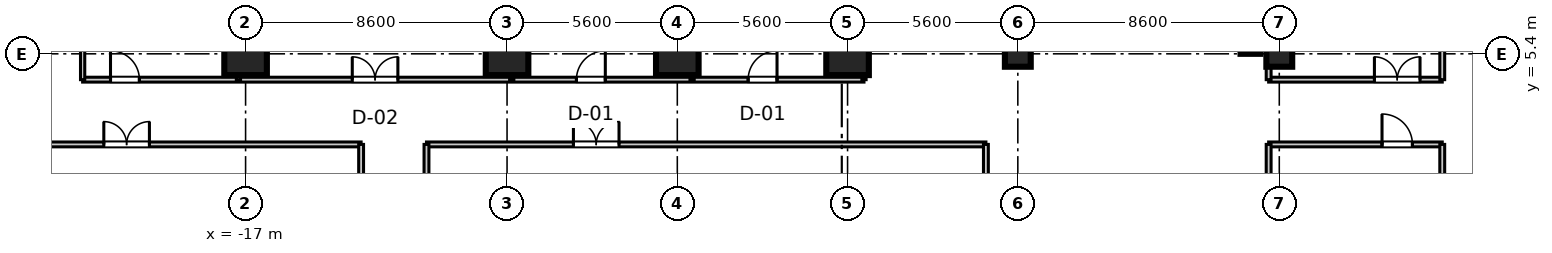
"""IFC4 building model, lengths in metres.
Left out: names, types, materials, properties, quantities, classifications, styles, units other than length and angle.
Written with IfcOpenShell. Run it as: python <this file> out.ifc"""

import sys

from ifc_helpers import new_model, si_unit, direction, frame, frame_2d, origin, origin_2d, place, context, subcontext, project, spatial, rectangle, extrude, source, transform, mapped, element, fill, save


model = new_model("IFC4")
c1 = context("Model", 3, precision=1e-05, world=origin(), true_north=direction((0.0, 1.0)))
c2 = subcontext(c1, "Body", "Model", "MODEL_VIEW")
j1 = project(units=[si_unit("LENGTHUNIT", "METRE"), si_unit("PLANEANGLEUNIT", "RADIAN")], contexts=[c1])
p1 = place(None, origin())
s1 = spatial("IfcSite", under=j1, at=p1, CompositionType="ELEMENT")
p2 = place(p1, origin())
s2 = spatial("IfcBuilding", under=s1, at=p2, CompositionType="ELEMENT")
p3 = place(p2, frame((0.0, 0.0, 39.7)))
s3 = spatial("IfcBuildingStorey", under=s2, at=p3, CompositionType="ELEMENT", Elevation=39.7)
m1 = source(origin(), c2, "Body", "SweptSolid", [
    extrude(rectangle(XDim=1.4, YDim=1.4, at=origin_2d()), origin(), (0.0, 0.0, 1.0), 3.605),
])
for number, where, z_axis, x_axis in (
    (1, (-17.0, 5.4, 0.0), (0.0, 0.0, 1.0), (1.0, 0.0, 0.0)),
    (2, (-8.4, 5.4, 0.0), (0.0, 0.0, 1.0), (1.0, 0.0, 0.0)),
    (3, (-2.8, 5.4, 0.0), (0.0, 0.0, 1.0), (1.0, 0.0, 0.0)),
    (4, (2.8, 5.4, 0.0), (0.0, 0.0, 1.0), (1.0, 0.0, 0.0)),
):
    element("IfcColumn", number, at=place(p3, frame(where, z_axis=z_axis, x_axis=x_axis)), inside=s3, PredefinedType="COLUMN", context=c2, shape_type="MappedRepresentation", body=[
        mapped(m1, transform((0.0, 0.0, 0.0), scale=1.0)),
    ])
m2 = source(origin(), c2, "Body", "SweptSolid", [
    extrude(rectangle(XDim=0.85, YDim=0.85, at=origin_2d()), origin(), (0.0, 0.0, 1.0), 3.605),
])
for number, where, z_axis, x_axis in (
    (5, (8.4, 5.4, 0.0), (0.0, 0.0, 1.0), (1.0, 0.0, 0.0)),
    (6, (17.0, 5.4, 0.0), (0.0, 0.0, 1.0), (1.0, 0.0, 0.0)),
):
    element("IfcColumn", number, at=place(p3, frame(where, z_axis=z_axis, x_axis=x_axis)), inside=s3, PredefinedType="PILASTER", context=c2, shape_type="MappedRepresentation", body=[
        mapped(m2, transform((0.0, 0.0, 0.0), scale=1.0)),
    ])
m3 = source(origin(), c2, "Body", "SweptSolid", [
    extrude(rectangle(XDim=11.6, YDim=0.65, at=frame_2d((5.8, 0.0))), origin(), (0.0, 0.0, 1.0), 3.37),
])
p4 = place(p3, frame((16.05, 5.4, 0.0), z_axis=(0.0, 0.0, 1.0), x_axis=(0.0, 1.0, 0.0)))
e7 = element("IfcWall", 7, at=p4, inside=s3, PredefinedType="SHEAR", context=c2, shape_type="MappedRepresentation", body=[
    mapped(m3, transform((0.0, 0.0, 0.0), scale=1.0)),
])
m4 = source(origin(), c2, "Body", "SweptSolid", [
    extrude(rectangle(XDim=5.71, YDim=0.16, at=frame_2d((2.855, 0.0))), origin(), (0.0, 0.0, 1.0), 2.71),
])
p5 = place(p3, frame((16.65, 4.55, 0.0), z_axis=(0.0, 0.0, 1.0), x_axis=(1.0, 0.0, 0.0)))
e8 = element("IfcWall", 8, at=p5, inside=s3, PredefinedType="PARTITIONING", context=c2, shape_type="MappedRepresentation", body=[
    mapped(m4, transform((0.0, 0.0, 0.0), scale=1.0)),
])
p6 = place(p5, frame((3.479, 0.0, 0.0)))
e9 = element("IfcOpeningElement", 9, at=p6, cuts=e8, PredefinedType="OPENING", context=c2, shape_type="SweptSolid", body=[
    extrude(rectangle(XDim=1.5, YDim=2.15, at=frame_2d((0.75, 1.075))), frame((0.0, 0.09, 0.0), z_axis=(0.0, -1.0, 0.0), x_axis=(1.0, 0.0, 0.0)), (0.0, 0.0, 1.0), 0.18),
])
m5 = source(origin(), c2, "Body", "SweptSolid", [
    extrude(rectangle(XDim=20.55, YDim=0.16, at=frame_2d((10.275, 0.0))), origin(), (0.0, 0.0, 1.0), 2.71),
])
p7 = place(p3, frame((16.65, 4.55, 0.0), z_axis=(0.0, 0.0, 1.0), x_axis=(0.0, 1.0, 0.0)))
e10 = element("IfcWall", 10, at=p7, inside=s3, PredefinedType="PARTITIONING", context=c2, shape_type="MappedRepresentation", body=[
    mapped(m5, transform((0.0, 0.0, 0.0), scale=1.0)),
])
m6 = source(origin(), c2, "Body", "SweptSolid", [
    extrude(rectangle(XDim=19.13, YDim=0.16, at=frame_2d((9.565, 0.0))), origin(), (0.0, 0.0, 1.0), 2.71),
])
p8 = place(p3, frame((22.36, 4.55, 0.0), z_axis=(0.0, 0.0, 1.0), x_axis=(0.0, 1.0, 0.0)))
e11 = element("IfcWall", 11, at=p8, inside=s3, PredefinedType="PARTITIONING", context=c2, shape_type="MappedRepresentation", body=[
    mapped(m6, transform((0.0, 0.0, 0.0), scale=1.0)),
])
m7 = source(origin(), c2, "Body", "SweptSolid", [
    extrude(rectangle(XDim=25.7, YDim=0.16, at=frame_2d((12.85, 0.0))), origin(), (0.0, 0.0, 1.0), 2.71),
])
p9 = place(p3, frame((-22.36, 4.55, 0.0), z_axis=(0.0, 0.0, 1.0), x_axis=(1.0, 0.0, 0.0)))
e12 = element("IfcWall", 12, at=p9, inside=s3, PredefinedType="PARTITIONING", context=c2, shape_type="MappedRepresentation", body=[
    mapped(m7, transform((0.0, 0.0, 0.0), scale=1.0)),
])
p10 = place(p9, frame((0.917, 0.0, 0.0)))
e13 = element("IfcOpeningElement", 13, at=p10, cuts=e12, PredefinedType="OPENING", context=c2, shape_type="SweptSolid", body=[
    extrude(rectangle(XDim=0.95, YDim=2.1, at=frame_2d((0.475, 1.05))), frame((0.0, 0.09, 0.0), z_axis=(0.0, -1.0, 0.0), x_axis=(1.0, 0.0, 0.0)), (0.0, 0.0, 1.0), 0.18),
])
p11 = place(p9, frame((8.869, 0.0, 0.0)))
e14 = element("IfcOpeningElement", 14, at=p11, cuts=e12, PredefinedType="OPENING", context=c2, shape_type="SweptSolid", body=[
    extrude(rectangle(XDim=1.5, YDim=2.15, at=frame_2d((0.75, 1.075))), frame((0.0, 0.09, 0.0), z_axis=(0.0, -1.0, 0.0), x_axis=(1.0, 0.0, 0.0)), (0.0, 0.0, 1.0), 0.18),
])
p12 = place(p9, frame((16.242, 0.0, 0.0)))
e15 = element("IfcOpeningElement", 15, at=p12, cuts=e12, PredefinedType="OPENING", context=c2, shape_type="SweptSolid", body=[
    extrude(rectangle(XDim=0.95, YDim=2.1, at=frame_2d((0.475, 1.05))), frame((0.0, 0.09, 0.0), z_axis=(0.0, -1.0, 0.0), x_axis=(1.0, 0.0, 0.0)), (0.0, 0.0, 1.0), 0.18),
])
p13 = place(p9, frame((21.89, 0.0, 0.0)))
e16 = element("IfcOpeningElement", 16, at=p13, cuts=e12, PredefinedType="OPENING", context=c2, shape_type="SweptSolid", body=[
    extrude(rectangle(XDim=0.95, YDim=2.1, at=frame_2d((0.475, 1.05))), frame((0.0, 0.09, 0.0), z_axis=(0.0, -1.0, 0.0), x_axis=(1.0, 0.0, 0.0)), (0.0, 0.0, 1.0), 0.18),
])
m8 = source(origin(), c2, "Body", "SweptSolid", [
    extrude(rectangle(XDim=19.13, YDim=0.14, at=frame_2d((9.565, 0.0))), origin(), (0.0, 0.0, 1.0), 2.71),
])
p14 = place(p3, frame((-22.36, 4.55, 0.0), z_axis=(0.0, 0.0, 1.0), x_axis=(0.0, 1.0, 0.0)))
e17 = element("IfcWall", 17, at=p14, inside=s3, PredefinedType="PARTITIONING", context=c2, shape_type="MappedRepresentation", body=[
    mapped(m8, transform((0.0, 0.0, 0.0), scale=1.0)),
])
m9 = source(origin(), c2, "Body", "SweptSolid", [
    extrude(rectangle(XDim=20.55, YDim=0.14, at=frame_2d((10.275, 0.0))), origin(), (0.0, 0.0, 1.0), 2.71),
])
for number, where, z_axis, x_axis in (
    (18, (3.34, 4.55, 0.0), (0.0, 0.0, 1.0), (0.0, 1.0, 0.0)),
    (19, (-17.235, 4.55, 0.0), (0.0, 0.0, 1.0), (0.0, 1.0, 0.0)),
    (20, (-8.246, 4.55, 0.0), (0.0, 0.0, 1.0), (0.0, 1.0, 0.0)),
    (21, (-2.314, 4.55, 0.0), (0.0, 0.0, 1.0), (0.0, 1.0, 0.0)),
):
    element("IfcWall", number, at=place(p3, frame(where, z_axis=z_axis, x_axis=x_axis)), inside=s3, PredefinedType="PARTITIONING", context=c2, shape_type="MappedRepresentation", body=[
        mapped(m9, transform((0.0, 0.0, 0.0), scale=1.0)),
    ])
m10 = source(origin(), c2, "Body", "SweptSolid", [
    extrude(rectangle(XDim=11.9, YDim=0.16, at=frame_2d((5.95, 0.0))), origin(), (0.0, 0.0, 1.0), 2.71),
])
p15 = place(p3, frame((-25.1, 2.42, 0.0), z_axis=(0.0, 0.0, 1.0), x_axis=(1.0, 0.0, 0.0)))
e22 = element("IfcWall", 22, at=p15, inside=s3, PredefinedType="PARTITIONING", context=c2, shape_type="MappedRepresentation", body=[
    mapped(m10, transform((0.0, 0.0, 0.0), scale=1.0)),
])
p16 = place(p15, frame((3.437, 0.0, 0.0)))
e23 = element("IfcOpeningElement", 23, at=p16, cuts=e22, PredefinedType="OPENING", context=c2, shape_type="SweptSolid", body=[
    extrude(rectangle(XDim=1.5, YDim=2.15, at=frame_2d((0.75, 1.075))), frame((0.0, 0.09, 0.0), z_axis=(0.0, -1.0, 0.0), x_axis=(1.0, 0.0, 0.0)), (0.0, 0.0, 1.0), 0.18),
])
m11 = source(origin(), c2, "Body", "SweptSolid", [
    extrude(rectangle(XDim=4.84, YDim=0.16, at=frame_2d((2.42, 0.0))), origin(), (0.0, 0.0, 1.0), 2.71),
])
p17 = place(p3, frame((-13.2, -2.42, 0.0), z_axis=(0.0, 0.0, 1.0), x_axis=(0.0, 1.0, 0.0)))
e24 = element("IfcWall", 24, at=p17, inside=s3, PredefinedType="PARTITIONING", context=c2, shape_type="MappedRepresentation", body=[
    mapped(m11, transform((0.0, 0.0, 0.0), scale=1.0)),
])
m12 = source(origin(), c2, "Body", "SweptSolid", [
    extrude(rectangle(XDim=18.4, YDim=0.16, at=frame_2d((9.2, 0.0))), origin(), (0.0, 0.0, 1.0), 2.71),
])
p18 = place(p3, frame((-11.05, 2.42, 0.0), z_axis=(0.0, 0.0, 1.0), x_axis=(1.0, 0.0, 0.0)))
e25 = element("IfcWall", 25, at=p18, inside=s3, PredefinedType="PARTITIONING", context=c2, shape_type="MappedRepresentation", body=[
    mapped(m12, transform((0.0, 0.0, 0.0), scale=1.0)),
])
p19 = place(p18, frame((4.833, 0.0, 0.0)))
e26 = element("IfcOpeningElement", 26, at=p19, cuts=e25, PredefinedType="OPENING", context=c2, shape_type="SweptSolid", body=[
    extrude(rectangle(XDim=1.5, YDim=2.15, at=frame_2d((0.75, 1.075))), frame((0.0, 0.09, 0.0), z_axis=(0.0, -1.0, 0.0), x_axis=(1.0, 0.0, 0.0)), (0.0, 0.0, 1.0), 0.18),
])
for number, where, z_axis, x_axis in (
    (27, (-11.05, -2.42, 0.0), (0.0, 0.0, 1.0), (0.0, 1.0, 0.0)),
    (28, (7.35, -2.42, 0.0), (0.0, 0.0, 1.0), (0.0, 1.0, 0.0)),
):
    element("IfcWall", number, at=place(p3, frame(where, z_axis=z_axis, x_axis=x_axis)), inside=s3, PredefinedType="PARTITIONING", context=c2, shape_type="MappedRepresentation", body=[
        mapped(m11, transform((0.0, 0.0, 0.0), scale=1.0)),
    ])
p20 = place(p3, frame((16.65, 2.42, 0.0), z_axis=(0.0, 0.0, 1.0), x_axis=(1.0, 0.0, 0.0)))
e29 = element("IfcWall", 29, at=p20, inside=s3, PredefinedType="PARTITIONING", context=c2, shape_type="MappedRepresentation", body=[
    mapped(m4, transform((0.0, 0.0, 0.0), scale=1.0)),
])
p21 = place(p20, frame((3.729, 0.0, 0.0)))
e30 = element("IfcOpeningElement", 30, at=p21, cuts=e29, PredefinedType="OPENING", context=c2, shape_type="SweptSolid", body=[
    extrude(rectangle(XDim=1.0, YDim=2.1, at=frame_2d((0.5, 1.05))), frame((0.0, 0.09, 0.0), z_axis=(0.0, -1.0, 0.0), x_axis=(1.0, 0.0, 0.0)), (0.0, 0.0, 1.0), 0.18),
])
for number, where, z_axis, x_axis in (
    (31, (16.65, -2.42, 0.0), (0.0, 0.0, 1.0), (0.0, 1.0, 0.0)),
    (32, (22.36, -2.42, 0.0), (0.0, 0.0, 1.0), (0.0, 1.0, 0.0)),
):
    element("IfcWall", number, at=place(p3, frame(where, z_axis=z_axis, x_axis=x_axis)), inside=s3, PredefinedType="PARTITIONING", context=c2, shape_type="MappedRepresentation", body=[
        mapped(m11, transform((0.0, 0.0, 0.0), scale=1.0)),
    ])
m13 = source(origin(), c2, "Body", "SweptSolid", [
    extrude(rectangle(XDim=1.5, YDim=2.15, at=frame_2d((0.75, 1.075))), frame((0.0, 0.025, 0.0), z_axis=(0.0, -1.0, 0.0), x_axis=(1.0, 0.0, 0.0)), (0.0, 0.0, 1.0), 0.05),
])
p22 = place(p6, origin())
e33 = element("IfcDoor", 33, at=p22, inside=s3, OperationType="DOUBLE_DOOR_SINGLE_SWING", PredefinedType="DOOR", context=c2, shape_type="MappedRepresentation", body=[
    mapped(m13, transform((0.0, 0.0, 0.0), scale=1.0)),
])
fill(e9, e33)
m14 = source(origin(), c2, "Body", "SweptSolid", [
    extrude(rectangle(XDim=0.95, YDim=2.1, at=frame_2d((0.475, 1.05))), frame((0.0, 0.025, 0.0), z_axis=(0.0, -1.0, 0.0), x_axis=(1.0, 0.0, 0.0)), (0.0, 0.0, 1.0), 0.05),
])
p23 = place(p10, origin())
e34 = element("IfcDoor", 34, at=p23, inside=s3, OperationType="SINGLE_SWING_LEFT", PredefinedType="DOOR", context=c2, shape_type="MappedRepresentation", body=[
    mapped(m14, transform((0.0, 0.0, 0.0), scale=1.0)),
])
fill(e13, e34)
p24 = place(p11, origin())
e35 = element("IfcDoor", 35, at=p24, inside=s3, OperationType="DOUBLE_DOOR_SINGLE_SWING", PredefinedType="DOOR", context=c2, shape_type="MappedRepresentation", body=[
    mapped(m13, transform((0.0, 0.0, 0.0), scale=1.0)),
])
fill(e14, e35)
p25 = place(p12, origin())
e36 = element("IfcDoor", 36, at=p25, inside=s3, OperationType="SINGLE_SWING_RIGHT", PredefinedType="DOOR", context=c2, shape_type="MappedRepresentation", body=[
    mapped(m14, transform((0.0, 0.0, 0.0), scale=1.0)),
])
fill(e15, e36)
p26 = place(p13, origin())
e37 = element("IfcDoor", 37, at=p26, inside=s3, OperationType="SINGLE_SWING_RIGHT", PredefinedType="DOOR", context=c2, shape_type="MappedRepresentation", body=[
    mapped(m14, transform((0.0, 0.0, 0.0), scale=1.0)),
])
fill(e16, e37)
p27 = place(p16, origin())
e38 = element("IfcDoor", 38, at=p27, inside=s3, OperationType="DOUBLE_DOOR_SINGLE_SWING", PredefinedType="DOOR", context=c2, shape_type="MappedRepresentation", body=[
    mapped(m13, transform((0.0, 0.0, 0.0), scale=1.0)),
])
fill(e23, e38)
p28 = place(p19, frame((1.5, 0.0, 0.0), z_axis=(0.0, 0.0, 1.0), x_axis=(-1.0, 0.0, 0.0)))
e39 = element("IfcDoor", 39, at=p28, inside=s3, OperationType="DOUBLE_DOOR_SINGLE_SWING", PredefinedType="DOOR", context=c2, shape_type="MappedRepresentation", body=[
    mapped(m13, transform((0.0, 0.0, 0.0), scale=1.0)),
])
fill(e26, e39)
m15 = source(origin(), c2, "Body", "SweptSolid", [
    extrude(rectangle(XDim=1.0, YDim=2.1, at=frame_2d((0.5, 1.05))), frame((0.0, 0.025, 0.0), z_axis=(0.0, -1.0, 0.0), x_axis=(1.0, 0.0, 0.0)), (0.0, 0.0, 1.0), 0.05),
])
p29 = place(p21, frame((1.0, 0.0, 0.0), z_axis=(0.0, 0.0, 1.0), x_axis=(-1.0, 0.0, 0.0)))
e40 = element("IfcDoor", 40, at=p29, inside=s3, OperationType="SINGLE_SWING_LEFT", PredefinedType="DOOR", context=c2, shape_type="MappedRepresentation", body=[
    mapped(m15, transform((0.0, 0.0, 0.0), scale=1.0)),
])
fill(e30, e40)
save(model, sys.argv[1])
